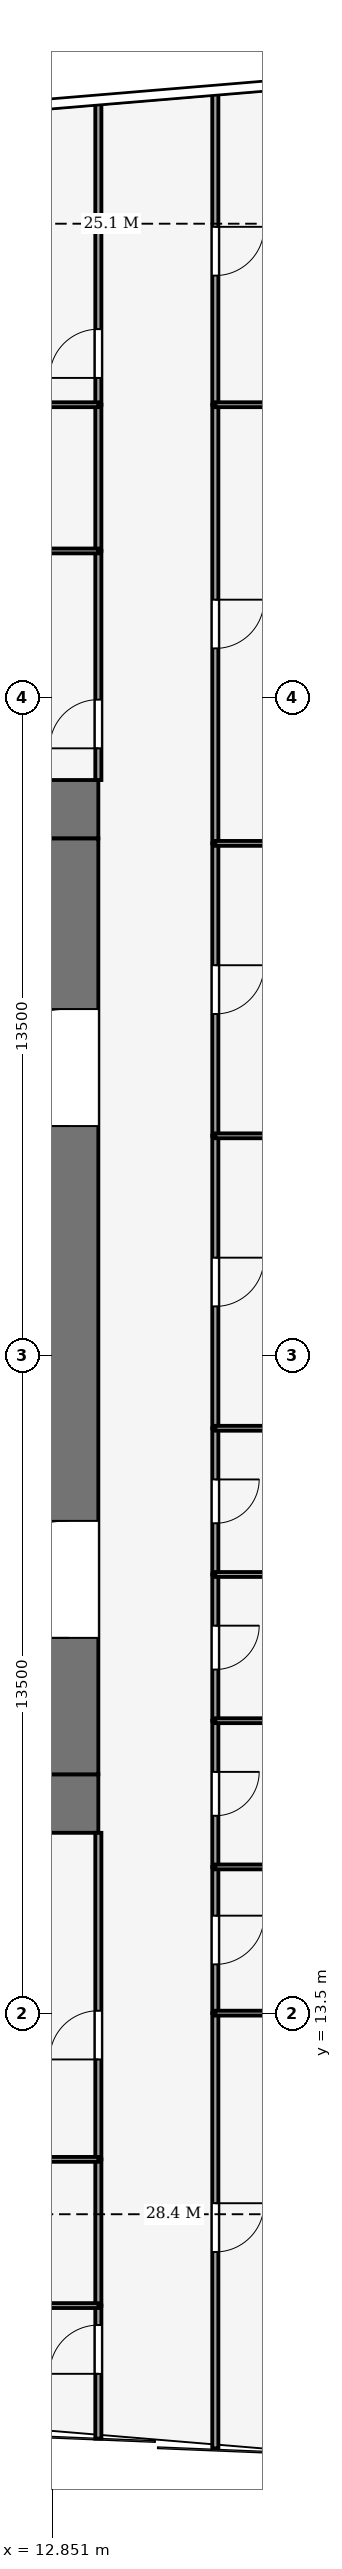
"""IFC4 building model, lengths in metres.
Left out: names, types, materials, properties, quantities, classifications, styles, units other than length and angle.
Written with IfcOpenShell. Run it as: python <this file> out.ifc"""

import sys

from ifc_helpers import new_model, si_unit, direction, frame, frame_2d, origin, place, context, subcontext, project, spatial, rectangle, extrude, element, fill, save


model = new_model("IFC4")
c1 = context("Model", 3, precision=1e-05, world=origin(), true_north=direction((0.0, 1.0)))
c2 = subcontext(c1, "Body", "Model", "MODEL_VIEW")
j1 = project(units=[si_unit("LENGTHUNIT", "METRE"), si_unit("PLANEANGLEUNIT", "RADIAN")], contexts=[c1])
p1 = place(None, origin())
s1 = spatial("IfcSite", under=j1, at=p1, CompositionType="ELEMENT")
p2 = place(p1, origin())
s2 = spatial("IfcBuilding", under=s1, at=p2, CompositionType="ELEMENT")
p3 = place(p2, frame((0.0, 0.0, 90.0)))
s3 = spatial("IfcBuildingStorey", under=s2, at=p3, CompositionType="ELEMENT", Elevation=90.0)
for number, where, z_axis, x_axis in (
    (1, (-13.8, 17.8, -0.13), (0.0, 0.0, 1.0), (1.0, 0.0, 0.0)),
    (2, (-13.8, 38.2, -0.13), (0.0, 0.0, 1.0), (1.0, 0.0, 0.0)),
):
    element("IfcWall", number, at=place(p3, frame(where, z_axis=z_axis, x_axis=x_axis)), inside=s3, PredefinedType="SHEAR", context=c2, shape_type="SweptSolid", body=[
        extrude(rectangle(XDim=27.6, YDim=1.2, at=frame_2d((13.8, 0.0))), origin(), (0.0, 0.0, 1.0), 4.0),
    ])
p4 = place(p3, frame((13.2, 18.4, -0.13), z_axis=(0.0, 0.0, 1.0), x_axis=(0.0, 1.0, 0.0)))
e3 = element("IfcWall", 3, at=p4, inside=s3, PredefinedType="SHEAR", context=c2, shape_type="SweptSolid", body=[
    extrude(rectangle(XDim=19.2, YDim=1.2, at=frame_2d((9.6, 0.0))), origin(), (0.0, 0.0, 1.0), 4.0),
])
p5 = place(p4, frame((2.8, 0.0, 0.13)))
e4 = element("IfcOpeningElement", 4, at=p5, cuts=e3, PredefinedType="OPENING", context=c2, shape_type="SweptSolid", body=[
    extrude(rectangle(XDim=2.4, YDim=2.4, at=frame_2d((1.2, 1.2))), frame((0.0, 0.61, 0.0), z_axis=(0.0, -1.0, 0.0), x_axis=(1.0, 0.0, 0.0)), (0.0, 0.0, 1.0), 1.22),
])
p6 = place(p4, frame((13.3, 0.0, 0.13)))
e5 = element("IfcOpeningElement", 5, at=p6, cuts=e3, PredefinedType="OPENING", context=c2, shape_type="SweptSolid", body=[
    extrude(rectangle(XDim=2.4, YDim=2.4, at=frame_2d((1.2, 1.2))), frame((0.0, 0.61, 0.0), z_axis=(0.0, -1.0, 0.0), x_axis=(1.0, 0.0, 0.0)), (0.0, 0.0, 1.0), 1.22),
])
p7 = place(p3, frame((16.2, 13.5, 0.0), z_axis=(0.0, 0.0, 1.0), x_axis=(0.0, -1.0, 0.0)))
e6 = element("IfcWall", 6, at=p7, inside=s3, PredefinedType="PARTITIONING", context=c2, shape_type="SweptSolid", body=[
    extrude(rectangle(XDim=8.93, YDim=0.125, at=frame_2d((4.465, 0.0))), origin(), (0.0, 0.0, 1.0), 3.04),
])
p8 = place(p7, frame((3.9, 0.0, 0.0)))
e7 = element("IfcOpeningElement", 7, at=p8, cuts=e6, PredefinedType="OPENING", context=c2, shape_type="SweptSolid", body=[
    extrude(rectangle(XDim=1.0, YDim=2.1, at=frame_2d((0.5, 1.05))), frame((0.0, 0.073, 0.0), z_axis=(0.0, -1.0, 0.0), x_axis=(1.0, 0.0, 0.0)), (0.0, 0.0, 1.0), 0.145),
])
p9 = place(p3, frame((16.2, 16.5, 0.0), z_axis=(0.0, 0.0, 1.0), x_axis=(0.0, -1.0, 0.0)))
e8 = element("IfcWall", 8, at=p9, inside=s3, PredefinedType="PARTITIONING", context=c2, shape_type="SweptSolid", body=[
    extrude(rectangle(XDim=3.0, YDim=0.125, at=frame_2d((1.5, 0.0))), origin(), (0.0, 0.0, 1.0), 3.87),
])
p10 = place(p9, frame((1.0, 0.0, 0.0)))
e9 = element("IfcOpeningElement", 9, at=p10, cuts=e8, PredefinedType="OPENING", context=c2, shape_type="SweptSolid", body=[
    extrude(rectangle(XDim=1.0, YDim=2.1, at=frame_2d((0.5, 1.05))), frame((0.0, 0.073, 0.0), z_axis=(0.0, -1.0, 0.0), x_axis=(1.0, 0.0, 0.0)), (0.0, 0.0, 1.0), 0.145),
])
p11 = place(p3, frame((16.2, 19.5, 0.0), z_axis=(0.0, 0.0, 1.0), x_axis=(0.0, -1.0, 0.0)))
e10 = element("IfcWall", 10, at=p11, inside=s3, PredefinedType="PARTITIONING", context=c2, shape_type="SweptSolid", body=[
    extrude(rectangle(XDim=3.0, YDim=0.125, at=frame_2d((1.5, 0.0))), origin(), (0.0, 0.0, 1.0), 3.14),
])
p12 = place(p11, frame((1.05, 0.0, 0.0)))
e11 = element("IfcOpeningElement", 11, at=p12, cuts=e10, PredefinedType="OPENING", context=c2, shape_type="SweptSolid", body=[
    extrude(rectangle(XDim=0.9, YDim=2.1, at=frame_2d((0.45, 1.05))), frame((0.0, 0.073, 0.0), z_axis=(0.0, -1.0, 0.0), x_axis=(1.0, 0.0, 0.0)), (0.0, 0.0, 1.0), 0.145),
])
p13 = place(p3, frame((16.2, 22.5, 0.0), z_axis=(0.0, 0.0, 1.0), x_axis=(0.0, -1.0, 0.0)))
e12 = element("IfcWall", 12, at=p13, inside=s3, PredefinedType="PARTITIONING", context=c2, shape_type="SweptSolid", body=[
    extrude(rectangle(XDim=3.0, YDim=0.125, at=frame_2d((1.5, 0.0))), origin(), (0.0, 0.0, 1.0), 3.87),
])
p14 = place(p13, frame((1.05, 0.0, 0.0)))
e13 = element("IfcOpeningElement", 13, at=p14, cuts=e12, PredefinedType="OPENING", context=c2, shape_type="SweptSolid", body=[
    extrude(rectangle(XDim=0.9, YDim=2.1, at=frame_2d((0.45, 1.05))), frame((0.0, 0.073, 0.0), z_axis=(0.0, -1.0, 0.0), x_axis=(1.0, 0.0, 0.0)), (0.0, 0.0, 1.0), 0.145),
])
p15 = place(p3, frame((16.2, 25.5, 0.0), z_axis=(0.0, 0.0, 1.0), x_axis=(0.0, -1.0, 0.0)))
e14 = element("IfcWall", 14, at=p15, inside=s3, PredefinedType="PARTITIONING", context=c2, shape_type="SweptSolid", body=[
    extrude(rectangle(XDim=3.0, YDim=0.125, at=frame_2d((1.5, 0.0))), origin(), (0.0, 0.0, 1.0), 3.48),
])
p16 = place(p15, frame((1.05, 0.0, 0.0)))
e15 = element("IfcOpeningElement", 15, at=p16, cuts=e14, PredefinedType="OPENING", context=c2, shape_type="SweptSolid", body=[
    extrude(rectangle(XDim=0.9, YDim=2.1, at=frame_2d((0.45, 1.05))), frame((0.0, 0.073, 0.0), z_axis=(0.0, -1.0, 0.0), x_axis=(1.0, 0.0, 0.0)), (0.0, 0.0, 1.0), 0.145),
])
p17 = place(p3, frame((16.2, 31.5, 0.0), z_axis=(0.0, 0.0, 1.0), x_axis=(0.0, -1.0, 0.0)))
e16 = element("IfcWall", 16, at=p17, inside=s3, PredefinedType="PARTITIONING", context=c2, shape_type="SweptSolid", body=[
    extrude(rectangle(XDim=6.0, YDim=0.125, at=frame_2d((3.0, 0.0))), origin(), (0.0, 0.0, 1.0), 3.48),
])
p18 = place(p17, frame((2.5, 0.0, 0.0)))
e17 = element("IfcOpeningElement", 17, at=p18, cuts=e16, PredefinedType="OPENING", context=c2, shape_type="SweptSolid", body=[
    extrude(rectangle(XDim=1.0, YDim=2.1, at=frame_2d((0.5, 1.05))), frame((0.0, 0.073, 0.0), z_axis=(0.0, -1.0, 0.0), x_axis=(1.0, 0.0, 0.0)), (0.0, 0.0, 1.0), 0.145),
])
p19 = place(p3, frame((16.2, 37.5, 0.0), z_axis=(0.0, 0.0, 1.0), x_axis=(0.0, -1.0, 0.0)))
e18 = element("IfcWall", 18, at=p19, inside=s3, PredefinedType="PARTITIONING", context=c2, shape_type="SweptSolid", body=[
    extrude(rectangle(XDim=6.0, YDim=0.125, at=frame_2d((3.0, 0.0))), origin(), (0.0, 0.0, 1.0), 3.48),
])
p20 = place(p19, frame((2.5, 0.0, 0.0)))
e19 = element("IfcOpeningElement", 19, at=p20, cuts=e18, PredefinedType="OPENING", context=c2, shape_type="SweptSolid", body=[
    extrude(rectangle(XDim=1.0, YDim=2.1, at=frame_2d((0.5, 1.05))), frame((0.0, 0.073, 0.0), z_axis=(0.0, -1.0, 0.0), x_axis=(1.0, 0.0, 0.0)), (0.0, 0.0, 1.0), 0.145),
])
p21 = place(p3, frame((16.2, 46.5, 0.0), z_axis=(0.0, 0.0, 1.0), x_axis=(0.0, -1.0, 0.0)))
e20 = element("IfcWall", 20, at=p21, inside=s3, PredefinedType="PARTITIONING", context=c2, shape_type="SweptSolid", body=[
    extrude(rectangle(XDim=9.0, YDim=0.125, at=frame_2d((4.5, 0.0))), origin(), (0.0, 0.0, 1.0), 3.14),
])
p22 = place(p21, frame((4.0, 0.0, 0.0)))
e21 = element("IfcOpeningElement", 21, at=p22, cuts=e20, PredefinedType="OPENING", context=c2, shape_type="SweptSolid", body=[
    extrude(rectangle(XDim=1.0, YDim=2.1, at=frame_2d((0.5, 1.05))), frame((0.0, 0.073, 0.0), z_axis=(0.0, -1.0, 0.0), x_axis=(1.0, 0.0, 0.0)), (0.0, 0.0, 1.0), 0.145),
])
p23 = place(p3, frame((16.2, 52.93, 0.0), z_axis=(0.0, 0.0, 1.0), x_axis=(0.0, -1.0, 0.0)))
e22 = element("IfcWall", 22, at=p23, inside=s3, PredefinedType="PARTITIONING", context=c2, shape_type="SweptSolid", body=[
    extrude(rectangle(XDim=6.43, YDim=0.125, at=frame_2d((3.215, 0.0))), origin(), (0.0, 0.0, 1.0), 3.04),
])
p24 = place(p23, frame((2.78, 0.0, 0.0)))
e23 = element("IfcOpeningElement", 23, at=p24, cuts=e22, PredefinedType="OPENING", context=c2, shape_type="SweptSolid", body=[
    extrude(rectangle(XDim=1.0, YDim=2.1, at=frame_2d((0.5, 1.05))), frame((0.0, 0.073, 0.0), z_axis=(0.0, -1.0, 0.0), x_axis=(1.0, 0.0, 0.0)), (0.0, 0.0, 1.0), 0.145),
])
p25 = place(p3, frame((13.8, 4.77, 0.0), z_axis=(0.0, 0.0, 1.0), x_axis=(0.0, 1.0, 0.0)))
e24 = element("IfcWall", 24, at=p25, inside=s3, PredefinedType="PARTITIONING", context=c2, shape_type="SweptSolid", body=[
    extrude(rectangle(XDim=2.73, YDim=0.125, at=frame_2d((1.365, 0.0))), origin(), (0.0, 0.0, 1.0), 3.04),
])
p26 = place(p25, frame((1.33, 0.0, 0.0)))
e25 = element("IfcOpeningElement", 25, at=p26, cuts=e24, PredefinedType="OPENING", context=c2, shape_type="SweptSolid", body=[
    extrude(rectangle(XDim=1.0, YDim=2.1, at=frame_2d((0.5, 1.05))), frame((0.0, 0.073, 0.0), z_axis=(0.0, -1.0, 0.0), x_axis=(1.0, 0.0, 0.0)), (0.0, 0.0, 1.0), 0.145),
])
p27 = place(p3, frame((13.8, 10.5, 0.0), z_axis=(0.0, 0.0, 1.0), x_axis=(0.0, -1.0, 0.0)))
e26 = element("IfcWall", 26, at=p27, inside=s3, PredefinedType="PARTITIONING", context=c2, shape_type="SweptSolid", body=[
    extrude(rectangle(XDim=3.0, YDim=0.125, at=frame_2d((1.5, 0.0))), origin(), (0.0, 0.0, 1.0), 3.87),
])
p28 = place(p3, frame((13.8, 10.5, 0.0), z_axis=(0.0, 0.0, 1.0), x_axis=(0.0, 1.0, 0.0)))
e27 = element("IfcWall", 27, at=p28, inside=s3, PredefinedType="PARTITIONING", context=c2, shape_type="SweptSolid", body=[
    extrude(rectangle(XDim=6.7, YDim=0.125, at=frame_2d((3.35, 0.0))), origin(), (0.0, 0.0, 1.0), 3.14),
])
p29 = place(p28, frame((2.05, 0.0, 0.0)))
e28 = element("IfcOpeningElement", 28, at=p29, cuts=e27, PredefinedType="OPENING", context=c2, shape_type="SweptSolid", body=[
    extrude(rectangle(XDim=1.0, YDim=2.1, at=frame_2d((0.5, 1.05))), frame((0.0, 0.073, 0.0), z_axis=(0.0, -1.0, 0.0), x_axis=(1.0, 0.0, 0.0)), (0.0, 0.0, 1.0), 0.145),
])
p30 = place(p3, frame((13.8, 38.8, 0.0), z_axis=(0.0, 0.0, 1.0), x_axis=(0.0, 1.0, 0.0)))
e29 = element("IfcWall", 29, at=p30, inside=s3, PredefinedType="PARTITIONING", context=c2, shape_type="SweptSolid", body=[
    extrude(rectangle(XDim=4.7, YDim=0.125, at=frame_2d((2.35, 0.0))), origin(), (0.0, 0.0, 1.0), 3.14),
])
p31 = place(p30, frame((0.65, 0.0, 0.0)))
e30 = element("IfcOpeningElement", 30, at=p31, cuts=e29, PredefinedType="OPENING", context=c2, shape_type="SweptSolid", body=[
    extrude(rectangle(XDim=1.0, YDim=2.1, at=frame_2d((0.5, 1.05))), frame((0.0, 0.073, 0.0), z_axis=(0.0, -1.0, 0.0), x_axis=(1.0, 0.0, 0.0)), (0.0, 0.0, 1.0), 0.145),
])
p32 = place(p3, frame((13.8, 46.5, 0.0), z_axis=(0.0, 0.0, 1.0), x_axis=(0.0, -1.0, 0.0)))
e31 = element("IfcWall", 31, at=p32, inside=s3, PredefinedType="PARTITIONING", context=c2, shape_type="SweptSolid", body=[
    extrude(rectangle(XDim=3.0, YDim=0.125, at=frame_2d((1.5, 0.0))), origin(), (0.0, 0.0, 1.0), 3.87),
])
p33 = place(p3, frame((13.8, 46.5, 0.0), z_axis=(0.0, 0.0, 1.0), x_axis=(0.0, 1.0, 0.0)))
e32 = element("IfcWall", 32, at=p33, inside=s3, PredefinedType="PARTITIONING", context=c2, shape_type="SweptSolid", body=[
    extrude(rectangle(XDim=6.23, YDim=0.125, at=frame_2d((3.115, 0.0))), origin(), (0.0, 0.0, 1.0), 3.04),
])
p34 = place(p33, frame((0.55, 0.0, 0.0)))
e33 = element("IfcOpeningElement", 33, at=p34, cuts=e32, PredefinedType="OPENING", context=c2, shape_type="SweptSolid", body=[
    extrude(rectangle(XDim=1.0, YDim=2.1, at=frame_2d((0.5, 1.05))), frame((0.0, 0.073, 0.0), z_axis=(0.0, -1.0, 0.0), x_axis=(1.0, 0.0, 0.0)), (0.0, 0.0, 1.0), 0.145),
])
p35 = place(p3, frame((23.833, 13.5, 0.0), z_axis=(0.0, 0.0, 1.0), x_axis=(-1.0, 0.0, 0.0)))
e34 = element("IfcWall", 34, at=p35, inside=s3, PredefinedType="PARTITIONING", context=c2, shape_type="SweptSolid", body=[
    extrude(rectangle(XDim=7.634, YDim=0.1, at=frame_2d((3.817, 0.0))), origin(), (0.0, 0.0, 1.0), 3.04),
])
p36 = place(p3, frame((23.587, 16.5, 0.0), z_axis=(0.0, 0.0, 1.0), x_axis=(-1.0, 0.0, 0.0)))
e35 = element("IfcWall", 35, at=p36, inside=s3, PredefinedType="PARTITIONING", context=c2, shape_type="SweptSolid", body=[
    extrude(rectangle(XDim=7.387, YDim=0.1, at=frame_2d((3.693, 0.0))), origin(), (0.0, 0.0, 1.0), 3.04),
])
p37 = place(p3, frame((23.34, 19.5, 0.0), z_axis=(0.0, 0.0, 1.0), x_axis=(-1.0, 0.0, 0.0)))
e36 = element("IfcWall", 36, at=p37, inside=s3, PredefinedType="PARTITIONING", context=c2, shape_type="SweptSolid", body=[
    extrude(rectangle(XDim=7.14, YDim=0.1, at=frame_2d((3.57, 0.0))), origin(), (0.0, 0.0, 1.0), 3.04),
])
p38 = place(p3, frame((23.094, 22.5, 0.0), z_axis=(0.0, 0.0, 1.0), x_axis=(-1.0, 0.0, 0.0)))
e37 = element("IfcWall", 37, at=p38, inside=s3, PredefinedType="PARTITIONING", context=c2, shape_type="SweptSolid", body=[
    extrude(rectangle(XDim=6.894, YDim=0.1, at=frame_2d((3.447, 0.0))), origin(), (0.0, 0.0, 1.0), 3.04),
])
p39 = place(p3, frame((22.847, 25.5, 0.0), z_axis=(0.0, 0.0, 1.0), x_axis=(-1.0, 0.0, 0.0)))
e38 = element("IfcWall", 38, at=p39, inside=s3, PredefinedType="PARTITIONING", context=c2, shape_type="SweptSolid", body=[
    extrude(rectangle(XDim=6.647, YDim=0.1, at=frame_2d((3.324, 0.0))), origin(), (0.0, 0.0, 1.0), 3.04),
])
p40 = place(p3, frame((22.806, 31.5, 0.0), z_axis=(0.0, 0.0, 1.0), x_axis=(-1.0, 0.0, 0.0)))
e39 = element("IfcWall", 39, at=p40, inside=s3, PredefinedType="PARTITIONING", context=c2, shape_type="SweptSolid", body=[
    extrude(rectangle(XDim=6.606, YDim=0.1, at=frame_2d((3.303, 0.0))), origin(), (0.0, 0.0, 1.0), 3.04),
])
p41 = place(p3, frame((23.299, 37.5, 0.0), z_axis=(0.0, 0.0, 1.0), x_axis=(-1.0, 0.0, 0.0)))
e40 = element("IfcWall", 40, at=p41, inside=s3, PredefinedType="PARTITIONING", context=c2, shape_type="SweptSolid", body=[
    extrude(rectangle(XDim=7.099, YDim=0.1, at=frame_2d((3.55, 0.0))), origin(), (0.0, 0.0, 1.0), 3.04),
])
p42 = place(p3, frame((24.039, 46.5, 0.0), z_axis=(0.0, 0.0, 1.0), x_axis=(-1.0, 0.0, 0.0)))
e41 = element("IfcWall", 41, at=p42, inside=s3, PredefinedType="PARTITIONING", context=c2, shape_type="SweptSolid", body=[
    extrude(rectangle(XDim=7.839, YDim=0.1, at=frame_2d((3.919, 0.0))), origin(), (0.0, 0.0, 1.0), 3.04),
])
p43 = place(p3, frame((13.8, 7.5, 0.0), z_axis=(0.0, 0.0, 1.0), x_axis=(-1.0, 0.0, 0.0)))
e42 = element("IfcWall", 42, at=p43, inside=s3, PredefinedType="PARTITIONING", context=c2, shape_type="SweptSolid", body=[
    extrude(rectangle(XDim=6.3, YDim=0.1, at=frame_2d((3.15, 0.0))), origin(), (0.0, 0.0, 1.0), 3.39),
])
p44 = place(p3, frame((13.8, 10.5, 0.0), z_axis=(0.0, 0.0, 1.0), x_axis=(-1.0, 0.0, 0.0)))
e43 = element("IfcWall", 43, at=p44, inside=s3, PredefinedType="PARTITIONING", context=c2, shape_type="SweptSolid", body=[
    extrude(rectangle(XDim=6.3, YDim=0.1, at=frame_2d((3.15, 0.0))), origin(), (0.0, 0.0, 1.0), 3.39),
])
p45 = place(p44, frame((2.65, 0.0, 0.0)))
e44 = element("IfcOpeningElement", 44, at=p45, cuts=e43, PredefinedType="OPENING", context=c2, shape_type="SweptSolid", body=[
    extrude(rectangle(XDim=1.0, YDim=2.1, at=frame_2d((0.5, 1.05))), frame((0.0, 0.06, 0.0), z_axis=(0.0, -1.0, 0.0), x_axis=(1.0, 0.0, 0.0)), (0.0, 0.0, 1.0), 0.12),
])
p46 = place(p3, frame((13.8, 43.5, 0.0), z_axis=(0.0, 0.0, 1.0), x_axis=(-1.0, 0.0, 0.0)))
e45 = element("IfcWall", 45, at=p46, inside=s3, PredefinedType="PARTITIONING", context=c2, shape_type="SweptSolid", body=[
    extrude(rectangle(XDim=3.3, YDim=0.1, at=frame_2d((1.65, 0.0))), origin(), (0.0, 0.0, 1.0), 3.39),
])
p47 = place(p3, frame((13.8, 46.5, 0.0), z_axis=(0.0, 0.0, 1.0), x_axis=(-1.0, 0.0, 0.0)))
e46 = element("IfcWall", 46, at=p47, inside=s3, PredefinedType="PARTITIONING", context=c2, shape_type="SweptSolid", body=[
    extrude(rectangle(XDim=3.3, YDim=0.1, at=frame_2d((1.65, 0.0))), origin(), (0.0, 0.0, 1.0), 3.39),
])
p48 = place(p47, frame((1.95, 0.0, 0.0)))
e47 = element("IfcOpeningElement", 47, at=p48, cuts=e46, PredefinedType="OPENING", context=c2, shape_type="SweptSolid", body=[
    extrude(rectangle(XDim=1.0, YDim=2.1, at=frame_2d((0.5, 1.05))), frame((0.0, 0.06, 0.0), z_axis=(0.0, -1.0, 0.0), x_axis=(1.0, 0.0, 0.0)), (0.0, 0.0, 1.0), 0.12),
])
p49 = place(p5, origin())
e48 = element("IfcDoor", 48, at=p49, inside=s3, OperationType="DOUBLE_DOOR_SINGLE_SWING", PredefinedType="DOOR", context=c2, shape_type="SweptSolid", body=[
    extrude(rectangle(XDim=2.4, YDim=2.4, at=frame_2d((1.2, 1.2))), frame((0.0, 0.025, 0.0), z_axis=(0.0, -1.0, 0.0), x_axis=(1.0, 0.0, 0.0)), (0.0, 0.0, 1.0), 0.05),
])
fill(e4, e48)
p50 = place(p6, origin())
e49 = element("IfcDoor", 49, at=p50, inside=s3, OperationType="DOUBLE_DOOR_SINGLE_SWING", PredefinedType="DOOR", context=c2, shape_type="SweptSolid", body=[
    extrude(rectangle(XDim=2.4, YDim=2.4, at=frame_2d((1.2, 1.2))), frame((0.0, 0.025, 0.0), z_axis=(0.0, -1.0, 0.0), x_axis=(1.0, 0.0, 0.0)), (0.0, 0.0, 1.0), 0.05),
])
fill(e5, e49)
p51 = place(p8, origin())
e50 = element("IfcDoor", 50, at=p51, inside=s3, OperationType="SINGLE_SWING_LEFT", PredefinedType="DOOR", context=c2, shape_type="SweptSolid", body=[
    extrude(rectangle(XDim=1.0, YDim=2.1, at=frame_2d((0.5, 1.05))), frame((0.0, 0.025, 0.0), z_axis=(0.0, -1.0, 0.0), x_axis=(1.0, 0.0, 0.0)), (0.0, 0.0, 1.0), 0.05),
])
fill(e7, e50)
p52 = place(p10, origin())
e51 = element("IfcDoor", 51, at=p52, inside=s3, OperationType="SINGLE_SWING_LEFT", PredefinedType="DOOR", context=c2, shape_type="SweptSolid", body=[
    extrude(rectangle(XDim=1.0, YDim=2.1, at=frame_2d((0.5, 1.05))), frame((0.0, 0.025, 0.0), z_axis=(0.0, -1.0, 0.0), x_axis=(1.0, 0.0, 0.0)), (0.0, 0.0, 1.0), 0.05),
])
fill(e9, e51)
p53 = place(p12, origin())
e52 = element("IfcDoor", 52, at=p53, inside=s3, OperationType="SINGLE_SWING_RIGHT", PredefinedType="DOOR", context=c2, shape_type="SweptSolid", body=[
    extrude(rectangle(XDim=0.9, YDim=2.1, at=frame_2d((0.45, 1.05))), frame((0.0, 0.025, 0.0), z_axis=(0.0, -1.0, 0.0), x_axis=(1.0, 0.0, 0.0)), (0.0, 0.0, 1.0), 0.05),
])
fill(e11, e52)
p54 = place(p14, origin())
e53 = element("IfcDoor", 53, at=p54, inside=s3, OperationType="SINGLE_SWING_LEFT", PredefinedType="DOOR", context=c2, shape_type="SweptSolid", body=[
    extrude(rectangle(XDim=0.9, YDim=2.1, at=frame_2d((0.45, 1.05))), frame((0.0, 0.025, 0.0), z_axis=(0.0, -1.0, 0.0), x_axis=(1.0, 0.0, 0.0)), (0.0, 0.0, 1.0), 0.05),
])
fill(e13, e53)
p55 = place(p16, origin())
e54 = element("IfcDoor", 54, at=p55, inside=s3, OperationType="SINGLE_SWING_RIGHT", PredefinedType="DOOR", context=c2, shape_type="SweptSolid", body=[
    extrude(rectangle(XDim=0.9, YDim=2.1, at=frame_2d((0.45, 1.05))), frame((0.0, 0.025, 0.0), z_axis=(0.0, -1.0, 0.0), x_axis=(1.0, 0.0, 0.0)), (0.0, 0.0, 1.0), 0.05),
])
fill(e15, e54)
p56 = place(p18, origin())
e55 = element("IfcDoor", 55, at=p56, inside=s3, OperationType="SINGLE_SWING_LEFT", PredefinedType="DOOR", context=c2, shape_type="SweptSolid", body=[
    extrude(rectangle(XDim=1.0, YDim=2.1, at=frame_2d((0.5, 1.05))), frame((0.0, 0.025, 0.0), z_axis=(0.0, -1.0, 0.0), x_axis=(1.0, 0.0, 0.0)), (0.0, 0.0, 1.0), 0.05),
])
fill(e17, e55)
p57 = place(p20, origin())
e56 = element("IfcDoor", 56, at=p57, inside=s3, OperationType="SINGLE_SWING_RIGHT", PredefinedType="DOOR", context=c2, shape_type="SweptSolid", body=[
    extrude(rectangle(XDim=1.0, YDim=2.1, at=frame_2d((0.5, 1.05))), frame((0.0, 0.025, 0.0), z_axis=(0.0, -1.0, 0.0), x_axis=(1.0, 0.0, 0.0)), (0.0, 0.0, 1.0), 0.05),
])
fill(e19, e56)
p58 = place(p22, origin())
e57 = element("IfcDoor", 57, at=p58, inside=s3, OperationType="SINGLE_SWING_LEFT", PredefinedType="DOOR", context=c2, shape_type="SweptSolid", body=[
    extrude(rectangle(XDim=1.0, YDim=2.1, at=frame_2d((0.5, 1.05))), frame((0.0, 0.025, 0.0), z_axis=(0.0, -1.0, 0.0), x_axis=(1.0, 0.0, 0.0)), (0.0, 0.0, 1.0), 0.05),
])
fill(e21, e57)
p59 = place(p24, origin())
e58 = element("IfcDoor", 58, at=p59, inside=s3, OperationType="SINGLE_SWING_RIGHT", PredefinedType="DOOR", context=c2, shape_type="SweptSolid", body=[
    extrude(rectangle(XDim=1.0, YDim=2.1, at=frame_2d((0.5, 1.05))), frame((0.0, 0.025, 0.0), z_axis=(0.0, -1.0, 0.0), x_axis=(1.0, 0.0, 0.0)), (0.0, 0.0, 1.0), 0.05),
])
fill(e23, e58)
p60 = place(p26, origin())
e59 = element("IfcDoor", 59, at=p60, inside=s3, OperationType="SINGLE_SWING_RIGHT", PredefinedType="DOOR", context=c2, shape_type="SweptSolid", body=[
    extrude(rectangle(XDim=1.0, YDim=2.1, at=frame_2d((0.5, 1.05))), frame((0.0, 0.025, 0.0), z_axis=(0.0, -1.0, 0.0), x_axis=(1.0, 0.0, 0.0)), (0.0, 0.0, 1.0), 0.05),
])
fill(e25, e59)
p61 = place(p29, origin())
e60 = element("IfcDoor", 60, at=p61, inside=s3, OperationType="SINGLE_SWING_LEFT", PredefinedType="DOOR", context=c2, shape_type="SweptSolid", body=[
    extrude(rectangle(XDim=1.0, YDim=2.1, at=frame_2d((0.5, 1.05))), frame((0.0, 0.025, 0.0), z_axis=(0.0, -1.0, 0.0), x_axis=(1.0, 0.0, 0.0)), (0.0, 0.0, 1.0), 0.05),
])
fill(e28, e60)
p62 = place(p31, origin())
e61 = element("IfcDoor", 61, at=p62, inside=s3, OperationType="SINGLE_SWING_LEFT", PredefinedType="DOOR", context=c2, shape_type="SweptSolid", body=[
    extrude(rectangle(XDim=1.0, YDim=2.1, at=frame_2d((0.5, 1.05))), frame((0.0, 0.025, 0.0), z_axis=(0.0, -1.0, 0.0), x_axis=(1.0, 0.0, 0.0)), (0.0, 0.0, 1.0), 0.05),
])
fill(e30, e61)
p63 = place(p34, origin())
e62 = element("IfcDoor", 62, at=p63, inside=s3, OperationType="SINGLE_SWING_LEFT", PredefinedType="DOOR", context=c2, shape_type="SweptSolid", body=[
    extrude(rectangle(XDim=1.0, YDim=2.1, at=frame_2d((0.5, 1.05))), frame((0.0, 0.025, 0.0), z_axis=(0.0, -1.0, 0.0), x_axis=(1.0, 0.0, 0.0)), (0.0, 0.0, 1.0), 0.05),
])
fill(e33, e62)
save(model, sys.argv[1])
